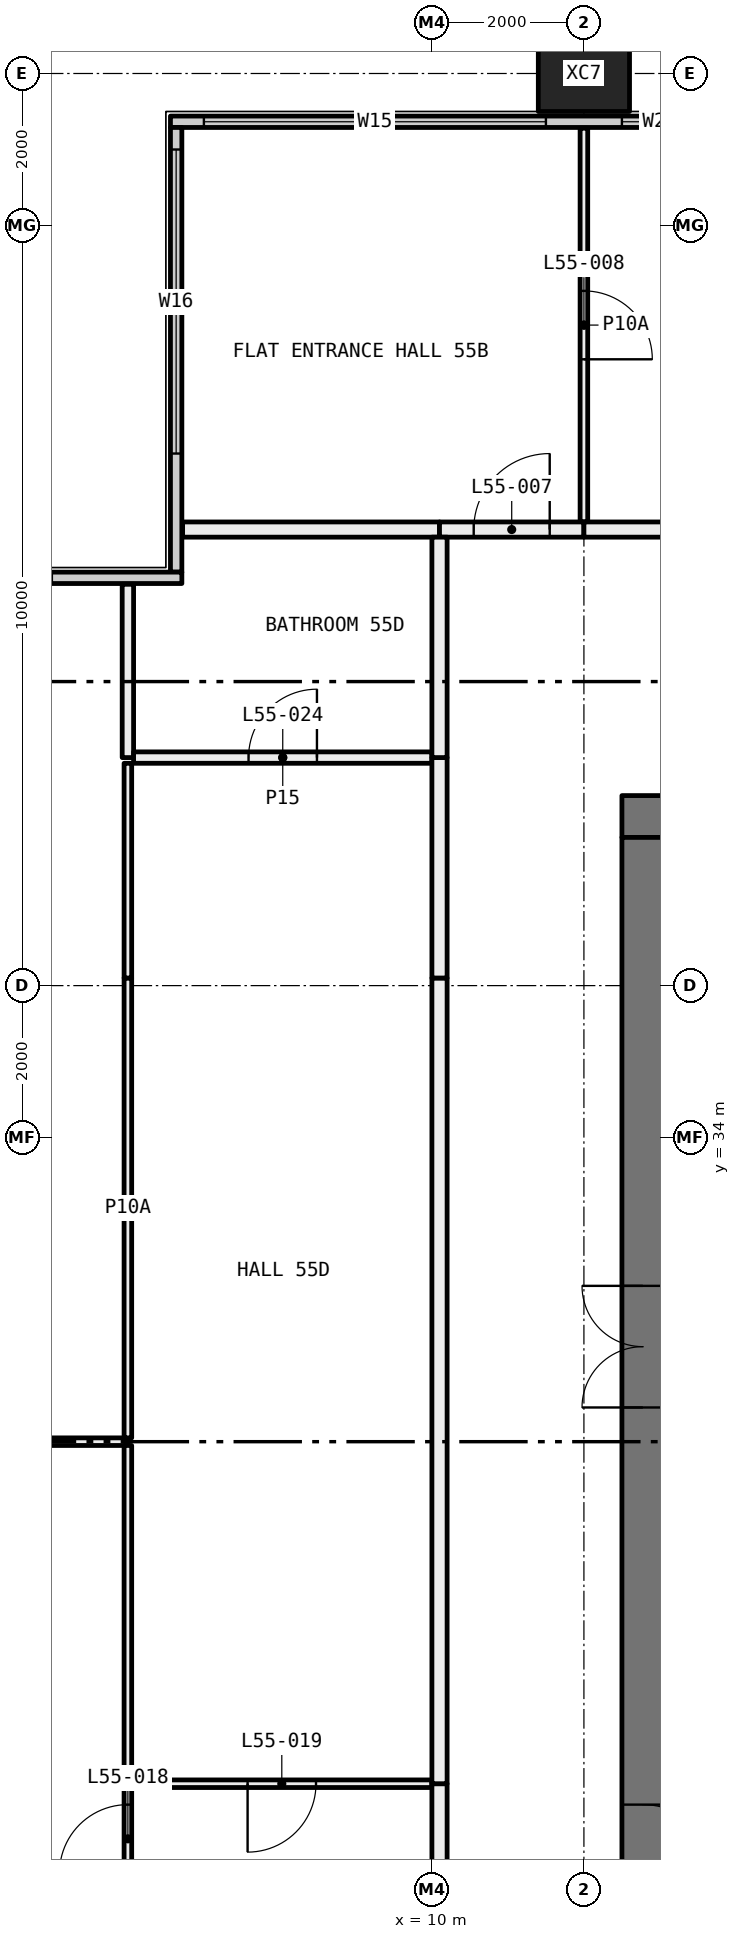
"""IFC4 building model, lengths in metres.
Left out: names, types, materials, properties, quantities, classifications, styles, units other than length and angle.
Written with IfcOpenShell. Run it as: python <this file> out.ifc"""

import sys

from ifc_helpers import new_model, si_unit, direction, frame, frame_2d, origin, origin_2d, place, context, subcontext, project, spatial, rectangle, hollow_rectangle, extrude, element, fill, save


model = new_model("IFC4")
c1 = context("Model", 3, precision=1e-05, world=origin(), true_north=direction((0.0, 1.0)))
c2 = subcontext(c1, "Body", "Model", "MODEL_VIEW")
j1 = project(units=[si_unit("LENGTHUNIT", "METRE"), si_unit("PLANEANGLEUNIT", "RADIAN")], contexts=[c1])
p1 = place(None, origin())
s1 = spatial("IfcSite", under=j1, at=p1, CompositionType="ELEMENT")
p2 = place(p1, origin())
s2 = spatial("IfcBuilding", under=s1, at=p2, CompositionType="ELEMENT")
p3 = place(p2, frame((0.0, 0.0, 206.55)))
s3 = spatial("IfcBuildingStorey", under=s2, at=p3, CompositionType="ELEMENT", Elevation=206.55)
p4 = place(p3, frame((12.0, 48.0, -0.4), z_axis=(0.0, 0.0, 1.0), x_axis=(1.0, 0.0, 0.0)))
e1 = element("IfcColumn", 1, at=p4, inside=s3, PredefinedType="COLUMN", context=c2, shape_type="SweptSolid", body=[
    extrude(hollow_rectangle(XDim=1.2, YDim=1.0, WallThickness=0.045, at=origin_2d()), origin(), (0.0, 0.0, 1.0), 3.45),
])
p5 = place(p3, frame((6.56, 47.365, 0.0), z_axis=(0.0, 0.0, 1.0), x_axis=(1.0, 0.0, 0.0)))
e2 = element("IfcWall", 2, at=p5, inside=s3, PredefinedType="ELEMENTEDWALL", context=c2, shape_type="SweptSolid", body=[
    extrude(rectangle(XDim=46.88, YDim=0.15, at=frame_2d((23.44, 0.0))), origin(), (0.0, 0.0, 1.0), 3.05),
])
p6 = place(p5, frame((0.44, 0.0, 0.45)))
e3 = element("IfcOpeningElement", 3, at=p6, cuts=e2, PredefinedType="OPENING", context=c2, shape_type="SweptSolid", body=[
    extrude(rectangle(XDim=4.5, YDim=2.55, at=frame_2d((2.25, 1.275))), frame((0.0, 0.085, 0.0), z_axis=(0.0, -1.0, 0.0), x_axis=(1.0, 0.0, 0.0)), (0.0, 0.0, 1.0), 0.17),
])
p7 = place(p5, frame((5.94, 0.0, 0.45)))
e4 = element("IfcOpeningElement", 4, at=p7, cuts=e2, PredefinedType="OPENING", context=c2, shape_type="SweptSolid", body=[
    extrude(rectangle(XDim=1.0, YDim=2.55, at=frame_2d((0.5, 1.275))), frame((0.0, 0.085, 0.0), z_axis=(0.0, -1.0, 0.0), x_axis=(1.0, 0.0, 0.0)), (0.0, 0.0, 1.0), 0.17),
])
p8 = place(p5, frame((9.44, 0.0, 0.45)))
e5 = element("IfcOpeningElement", 5, at=p8, cuts=e2, PredefinedType="OPENING", context=c2, shape_type="SweptSolid", body=[
    extrude(rectangle(XDim=1.5, YDim=2.55, at=frame_2d((0.75, 1.275))), frame((0.0, 0.085, 0.0), z_axis=(0.0, -1.0, 0.0), x_axis=(1.0, 0.0, 0.0)), (0.0, 0.0, 1.0), 0.17),
])
p9 = place(p5, frame((11.94, 0.0, 0.45)))
e6 = element("IfcOpeningElement", 6, at=p9, cuts=e2, PredefinedType="OPENING", context=c2, shape_type="SweptSolid", body=[
    extrude(rectangle(XDim=1.5, YDim=2.55, at=frame_2d((0.75, 1.275))), frame((0.0, 0.085, 0.0), z_axis=(0.0, -1.0, 0.0), x_axis=(1.0, 0.0, 0.0)), (0.0, 0.0, 1.0), 0.17),
])
p10 = place(p5, frame((15.94, 0.0, 0.45)))
e7 = element("IfcOpeningElement", 7, at=p10, cuts=e2, PredefinedType="OPENING", context=c2, shape_type="SweptSolid", body=[
    extrude(rectangle(XDim=1.0, YDim=2.55, at=frame_2d((0.5, 1.275))), frame((0.0, 0.085, 0.0), z_axis=(0.0, -1.0, 0.0), x_axis=(1.0, 0.0, 0.0)), (0.0, 0.0, 1.0), 0.17),
])
p11 = place(p5, frame((17.94, 0.0, 0.45)))
e8 = element("IfcOpeningElement", 8, at=p11, cuts=e2, PredefinedType="OPENING", context=c2, shape_type="SweptSolid", body=[
    extrude(rectangle(XDim=1.0, YDim=2.55, at=frame_2d((0.5, 1.275))), frame((0.0, 0.085, 0.0), z_axis=(0.0, -1.0, 0.0), x_axis=(1.0, 0.0, 0.0)), (0.0, 0.0, 1.0), 0.17),
])
p12 = place(p5, frame((21.44, 0.0, 0.45)))
e9 = element("IfcOpeningElement", 9, at=p12, cuts=e2, PredefinedType="OPENING", context=c2, shape_type="SweptSolid", body=[
    extrude(rectangle(XDim=1.5, YDim=2.55, at=frame_2d((0.75, 1.275))), frame((0.0, 0.085, 0.0), z_axis=(0.0, -1.0, 0.0), x_axis=(1.0, 0.0, 0.0)), (0.0, 0.0, 1.0), 0.17),
])
p13 = place(p5, frame((23.94, 0.0, 0.45)))
e10 = element("IfcOpeningElement", 10, at=p13, cuts=e2, PredefinedType="OPENING", context=c2, shape_type="SweptSolid", body=[
    extrude(rectangle(XDim=1.5, YDim=2.55, at=frame_2d((0.75, 1.275))), frame((0.0, 0.085, 0.0), z_axis=(0.0, -1.0, 0.0), x_axis=(1.0, 0.0, 0.0)), (0.0, 0.0, 1.0), 0.17),
])
p14 = place(p5, frame((27.94, 0.0, 0.45)))
e11 = element("IfcOpeningElement", 11, at=p14, cuts=e2, PredefinedType="OPENING", context=c2, shape_type="SweptSolid", body=[
    extrude(rectangle(XDim=1.0, YDim=2.55, at=frame_2d((0.5, 1.275))), frame((0.0, 0.085, 0.0), z_axis=(0.0, -1.0, 0.0), x_axis=(1.0, 0.0, 0.0)), (0.0, 0.0, 1.0), 0.17),
])
p15 = place(p5, frame((29.94, 0.0, 0.45)))
e12 = element("IfcOpeningElement", 12, at=p15, cuts=e2, PredefinedType="OPENING", context=c2, shape_type="SweptSolid", body=[
    extrude(rectangle(XDim=1.0, YDim=2.55, at=frame_2d((0.5, 1.275))), frame((0.0, 0.085, 0.0), z_axis=(0.0, -1.0, 0.0), x_axis=(1.0, 0.0, 0.0)), (0.0, 0.0, 1.0), 0.17),
])
p16 = place(p5, frame((33.44, 0.0, 0.45)))
e13 = element("IfcOpeningElement", 13, at=p16, cuts=e2, PredefinedType="OPENING", context=c2, shape_type="SweptSolid", body=[
    extrude(rectangle(XDim=1.5, YDim=2.55, at=frame_2d((0.75, 1.275))), frame((0.0, 0.085, 0.0), z_axis=(0.0, -1.0, 0.0), x_axis=(1.0, 0.0, 0.0)), (0.0, 0.0, 1.0), 0.17),
])
p17 = place(p5, frame((35.94, 0.0, 0.45)))
e14 = element("IfcOpeningElement", 14, at=p17, cuts=e2, PredefinedType="OPENING", context=c2, shape_type="SweptSolid", body=[
    extrude(rectangle(XDim=1.5, YDim=2.55, at=frame_2d((0.75, 1.275))), frame((0.0, 0.085, 0.0), z_axis=(0.0, -1.0, 0.0), x_axis=(1.0, 0.0, 0.0)), (0.0, 0.0, 1.0), 0.17),
])
p18 = place(p5, frame((39.94, 0.0, 0.45)))
e15 = element("IfcOpeningElement", 15, at=p18, cuts=e2, PredefinedType="OPENING", context=c2, shape_type="SweptSolid", body=[
    extrude(rectangle(XDim=1.0, YDim=2.55, at=frame_2d((0.5, 1.275))), frame((0.0, 0.085, 0.0), z_axis=(0.0, -1.0, 0.0), x_axis=(1.0, 0.0, 0.0)), (0.0, 0.0, 1.0), 0.17),
])
p19 = place(p5, frame((41.94, 0.0, 0.45)))
e16 = element("IfcOpeningElement", 16, at=p19, cuts=e2, PredefinedType="OPENING", context=c2, shape_type="SweptSolid", body=[
    extrude(rectangle(XDim=4.5, YDim=2.55, at=frame_2d((2.25, 1.275))), frame((0.0, 0.085, 0.0), z_axis=(0.0, -1.0, 0.0), x_axis=(1.0, 0.0, 0.0)), (0.0, 0.0, 1.0), 0.17),
])
p20 = place(p3, frame((6.635, 41.44, 0.0), z_axis=(0.0, 0.0, 1.0), x_axis=(0.0, 1.0, 0.0)))
e17 = element("IfcWall", 17, at=p20, inside=s3, PredefinedType="ELEMENTEDWALL", context=c2, shape_type="SweptSolid", body=[
    extrude(rectangle(XDim=5.85, YDim=0.15, at=frame_2d((2.925, 0.0))), origin(), (0.0, 0.0, 1.0), 3.05),
])
p21 = place(p20, frame((1.56, 0.0, 0.45)))
e18 = element("IfcOpeningElement", 18, at=p21, cuts=e17, PredefinedType="OPENING", context=c2, shape_type="SweptSolid", body=[
    extrude(rectangle(XDim=4.0, YDim=2.55, at=frame_2d((2.0, 1.275))), frame((0.0, 0.085, 0.0), z_axis=(0.0, -1.0, 0.0), x_axis=(1.0, 0.0, 0.0)), (0.0, 0.0, 1.0), 0.17),
])
p22 = place(p3, frame((0.56, 41.365, 0.0), z_axis=(0.0, 0.0, 1.0), x_axis=(1.0, 0.0, 0.0)))
e19 = element("IfcWall", 19, at=p22, inside=s3, PredefinedType="ELEMENTEDWALL", context=c2, shape_type="SweptSolid", body=[
    extrude(rectangle(XDim=6.15, YDim=0.15, at=frame_2d((3.075, 0.0))), origin(), (0.0, 0.0, 1.0), 3.05),
])
p23 = place(p22, frame((0.44, 0.0, 0.45)))
e20 = element("IfcOpeningElement", 20, at=p23, cuts=e19, PredefinedType="OPENING", context=c2, shape_type="SweptSolid", body=[
    extrude(rectangle(XDim=4.0, YDim=2.55, at=frame_2d((2.0, 1.275))), frame((0.0, 0.085, 0.0), z_axis=(0.0, -1.0, 0.0), x_axis=(1.0, 0.0, 0.0)), (0.0, 0.0, 1.0), 0.17),
])
p24 = place(p3, frame((12.0, 42.1, 0.0), z_axis=(0.0, 0.0, 1.0), x_axis=(0.0, 1.0, 0.0)))
e21 = element("IfcWall", 21, at=p24, inside=s3, PredefinedType="PARTITIONING", context=c2, shape_type="SweptSolid", body=[
    extrude(rectangle(XDim=5.18, YDim=0.1, at=frame_2d((2.59, 0.0))), origin(), (0.0, 0.0, 1.0), 3.05),
])
p25 = place(p24, frame((2.14, 0.0, 0.0)))
e22 = element("IfcOpeningElement", 22, at=p25, cuts=e21, PredefinedType="OPENING", context=c2, shape_type="SweptSolid", body=[
    extrude(rectangle(XDim=0.9, YDim=2.1, at=frame_2d((0.45, 1.05))), frame((0.0, 0.06, 0.0), z_axis=(0.0, -1.0, 0.0), x_axis=(1.0, 0.0, 0.0)), (0.0, 0.0, 1.0), 0.12),
])
p26 = place(p3, frame((6.72, 42.0, 0.0), z_axis=(0.0, 0.0, 1.0), x_axis=(1.0, 0.0, 0.0)))
e23 = element("IfcWall", 23, at=p26, inside=s3, PredefinedType="PARTITIONING", context=c2, shape_type="SweptSolid", body=[
    extrude(rectangle(XDim=3.38, YDim=0.2, at=frame_2d((1.69, 0.0))), origin(), (0.0, 0.0, 1.0), 3.05),
])
p27 = place(p3, frame((10.1, 42.0, 0.0), z_axis=(0.0, 0.0, 1.0), x_axis=(1.0, 0.0, 0.0)))
e24 = element("IfcWall", 24, at=p27, inside=s3, PredefinedType="PARTITIONING", context=c2, shape_type="SweptSolid", body=[
    extrude(rectangle(XDim=1.9, YDim=0.2, at=frame_2d((0.95, 0.0))), origin(), (0.0, 0.0, 1.0), 3.05),
])
p28 = place(p27, frame((0.45, 0.0, 0.0)))
e25 = element("IfcOpeningElement", 25, at=p28, cuts=e24, PredefinedType="OPENING", context=c2, shape_type="SweptSolid", body=[
    extrude(rectangle(XDim=1.0, YDim=2.1, at=frame_2d((0.5, 1.05))), frame((0.0, 0.11, 0.0), z_axis=(0.0, -1.0, 0.0), x_axis=(1.0, 0.0, 0.0)), (0.0, 0.0, 1.0), 0.22),
])
p29 = place(p3, frame((12.0, 42.0, 0.0), z_axis=(0.0, 0.0, 1.0), x_axis=(1.0, 0.0, 0.0)))
e26 = element("IfcWall", 26, at=p29, inside=s3, PredefinedType="PARTITIONING", context=c2, shape_type="SweptSolid", body=[
    extrude(rectangle(XDim=6.0, YDim=0.2, at=frame_2d((3.0, 0.0))), origin(), (0.0, 0.0, 1.0), 3.05),
])
p30 = place(p3, frame((6.0, 30.0, 0.0), z_axis=(0.0, 0.0, 1.0), x_axis=(-1.0, 0.0, 0.0)))
e27 = element("IfcWall", 27, at=p30, inside=s3, PredefinedType="PARTITIONING", context=c2, shape_type="SweptSolid", body=[
    extrude(rectangle(XDim=5.28, YDim=0.1, at=frame_2d((2.64, 0.0))), origin(), (0.0, 0.0, 1.0), 3.05),
])
p31 = place(p30, frame((2.19, 0.0, 0.0)))
e28 = element("IfcOpeningElement", 28, at=p31, cuts=e27, PredefinedType="OPENING", context=c2, shape_type="SweptSolid", body=[
    extrude(rectangle(XDim=0.9, YDim=2.1, at=frame_2d((0.45, 1.05))), frame((0.0, 0.06, 0.0), z_axis=(0.0, -1.0, 0.0), x_axis=(1.0, 0.0, 0.0)), (0.0, 0.0, 1.0), 0.12),
])
p32 = place(p3, frame((6.0, 24.05, 0.0), z_axis=(0.0, 0.0, 1.0), x_axis=(0.0, 1.0, 0.0)))
e29 = element("IfcWall", 29, at=p32, inside=s3, PredefinedType="PARTITIONING", context=c2, shape_type="SweptSolid", body=[
    extrude(rectangle(XDim=1.45, YDim=0.1, at=frame_2d((0.725, 0.0))), origin(), (0.0, 0.0, 1.0), 2.45),
])
p33 = place(p32, frame((0.275, 0.0, 0.0)))
e30 = element("IfcOpeningElement", 30, at=p33, cuts=e29, PredefinedType="OPENING", context=c2, shape_type="SweptSolid", body=[
    extrude(rectangle(XDim=0.9, YDim=2.1, at=frame_2d((0.45, 1.05))), frame((0.0, 0.06, 0.0), z_axis=(0.0, -1.0, 0.0), x_axis=(1.0, 0.0, 0.0)), (0.0, 0.0, 1.0), 0.12),
])
p34 = place(p3, frame((6.0, 25.5, 0.0), z_axis=(0.0, 0.0, 1.0), x_axis=(0.0, 1.0, 0.0)))
e31 = element("IfcWall", 31, at=p34, inside=s3, PredefinedType="PARTITIONING", context=c2, shape_type="SweptSolid", body=[
    extrude(rectangle(XDim=4.45, YDim=0.1, at=frame_2d((2.225, 0.0))), origin(), (0.0, 0.0, 1.0), 3.05),
])
p35 = place(p3, frame((6.0, 30.05, 0.0), z_axis=(0.0, 0.0, 1.0), x_axis=(0.0, 1.0, 0.0)))
e32 = element("IfcWall", 32, at=p35, inside=s3, PredefinedType="PARTITIONING", context=c2, shape_type="SweptSolid", body=[
    extrude(rectangle(XDim=6.05, YDim=0.1, at=frame_2d((3.025, 0.0))), origin(), (0.0, 0.0, 1.0), 2.45),
])
p36 = place(p3, frame((6.0, 36.1, 0.0), z_axis=(0.0, 0.0, 1.0), x_axis=(0.0, 1.0, 0.0)))
e33 = element("IfcWall", 33, at=p36, inside=s3, PredefinedType="PARTITIONING", context=c2, shape_type="SweptSolid", body=[
    extrude(rectangle(XDim=2.825, YDim=0.1, at=frame_2d((1.413, 0.0))), origin(), (0.0, 0.0, 1.0), 3.05),
])
p37 = place(p3, frame((6.0, 39.0, 0.0), z_axis=(0.0, 0.0, 1.0), x_axis=(0.0, 1.0, 0.0)))
e34 = element("IfcWall", 34, at=p37, inside=s3, PredefinedType="PARTITIONING", context=c2, shape_type="SweptSolid", body=[
    extrude(rectangle(XDim=2.28, YDim=0.15, at=frame_2d((1.14, 0.0))), origin(), (0.0, 0.0, 1.0), 3.05),
])
p38 = place(p3, frame((10.0, 25.5, 0.0), z_axis=(0.0, 0.0, 1.0), x_axis=(-1.0, 0.0, 0.0)))
e35 = element("IfcWall", 35, at=p38, inside=s3, PredefinedType="PARTITIONING", context=c2, shape_type="SweptSolid", body=[
    extrude(rectangle(XDim=3.95, YDim=0.1, at=frame_2d((1.975, 0.0))), origin(), (0.0, 0.0, 1.0), 3.05),
])
p39 = place(p38, frame((1.525, 0.0, 0.0)))
e36 = element("IfcOpeningElement", 36, at=p39, cuts=e35, PredefinedType="OPENING", context=c2, shape_type="SweptSolid", body=[
    extrude(rectangle(XDim=0.9, YDim=2.1, at=frame_2d((0.45, 1.05))), frame((0.0, 0.06, 0.0), z_axis=(0.0, -1.0, 0.0), x_axis=(1.0, 0.0, 0.0)), (0.0, 0.0, 1.0), 0.12),
])
p40 = place(p3, frame((10.1, 24.1, 0.0), z_axis=(0.0, 0.0, 1.0), x_axis=(0.0, 1.0, 0.0)))
e37 = element("IfcWall", 37, at=p40, inside=s3, PredefinedType="PARTITIONING", context=c2, shape_type="SweptSolid", body=[
    extrude(rectangle(XDim=1.4, YDim=0.2, at=frame_2d((0.7, 0.0))), origin(), (0.0, 0.0, 1.0), 3.05),
])
p41 = place(p3, frame((10.0, 39.0, 0.0), z_axis=(0.0, 0.0, 1.0), x_axis=(-1.0, 0.0, 0.0)))
e38 = element("IfcWall", 38, at=p41, inside=s3, PredefinedType="PARTITIONING", context=c2, shape_type="SweptSolid", body=[
    extrude(rectangle(XDim=3.925, YDim=0.15, at=frame_2d((1.962, 0.0))), origin(), (0.0, 0.0, 1.0), 3.05),
])
p42 = place(p41, frame((1.512, 0.0, 0.0)))
e39 = element("IfcOpeningElement", 39, at=p42, cuts=e38, PredefinedType="OPENING", context=c2, shape_type="SweptSolid", body=[
    extrude(rectangle(XDim=0.9, YDim=2.1, at=frame_2d((0.45, 1.05))), frame((0.0, 0.085, 0.0), z_axis=(0.0, -1.0, 0.0), x_axis=(1.0, 0.0, 0.0)), (0.0, 0.0, 1.0), 0.17),
])
p43 = place(p3, frame((10.1, 25.5, 0.0), z_axis=(0.0, 0.0, 1.0), x_axis=(0.0, 1.0, 0.0)))
e40 = element("IfcWall", 40, at=p43, inside=s3, PredefinedType="PARTITIONING", context=c2, shape_type="SweptSolid", body=[
    extrude(rectangle(XDim=10.6, YDim=0.2, at=frame_2d((5.3, 0.0))), origin(), (0.0, 0.0, 1.0), 2.45),
])
for number, where, z_axis, x_axis in (
    (41, (10.1, 36.1, 0.0), (0.0, 0.0, 1.0), (0.0, 1.0, 0.0)),
    (42, (10.1, 39.0, 0.0), (0.0, 0.0, 1.0), (0.0, 1.0, 0.0)),
):
    element("IfcWall", number, at=place(p3, frame(where, z_axis=z_axis, x_axis=x_axis)), inside=s3, PredefinedType="PARTITIONING", context=c2, shape_type="SweptSolid", body=[
        extrude(rectangle(XDim=2.9, YDim=0.2, at=frame_2d((1.45, 0.0))), origin(), (0.0, 0.0, 1.0), 3.05),
    ])
p44 = place(p3, frame((12.5, 38.225, 0.0), z_axis=(0.0, 0.0, 1.0), x_axis=(1.0, 0.0, 0.0)))
e43 = element("IfcWall", 43, at=p44, inside=s3, PredefinedType="SHEAR", context=c2, shape_type="SweptSolid", body=[
    extrude(rectangle(XDim=11.0, YDim=0.55, at=frame_2d((5.5, 0.0))), origin(), (0.0, 0.0, 1.0), 3.05),
])
p45 = place(p44, frame((8.525, 0.0, 0.0)))
e44 = element("IfcOpeningElement", 44, at=p45, cuts=e43, PredefinedType="OPENING", context=c2, shape_type="SweptSolid", body=[
    extrude(rectangle(XDim=1.6, YDim=2.1, at=frame_2d((0.8, 1.05))), frame((0.0, 0.285, 0.0), z_axis=(0.0, -1.0, 0.0), x_axis=(1.0, 0.0, 0.0)), (0.0, 0.0, 1.0), 0.57),
])
p46 = place(p3, frame((12.775, 22.05, 0.0), z_axis=(0.0, 0.0, 1.0), x_axis=(0.0, 1.0, 0.0)))
e45 = element("IfcWall", 45, at=p46, inside=s3, PredefinedType="SHEAR", context=c2, shape_type="SweptSolid", body=[
    extrude(rectangle(XDim=15.9, YDim=0.55, at=frame_2d((7.95, 0.0))), origin(), (0.0, 0.0, 1.0), 3.05),
])
p47 = place(p46, frame((8.4, 0.0, 0.0)))
e46 = element("IfcOpeningElement", 46, at=p47, cuts=e45, PredefinedType="OPENING", context=c2, shape_type="SweptSolid", body=[
    extrude(rectangle(XDim=1.6, YDim=2.1, at=frame_2d((0.8, 1.05))), frame((0.0, 0.285, 0.0), z_axis=(0.0, -1.0, 0.0), x_axis=(1.0, 0.0, 0.0)), (0.0, 0.0, 1.0), 0.57),
])
p48 = place(p46, frame((2.175, 0.0, 0.0)))
e47 = element("IfcOpeningElement", 47, at=p48, cuts=e45, PredefinedType="OPENING", context=c2, shape_type="SweptSolid", body=[
    extrude(rectangle(XDim=1.0, YDim=2.1, at=frame_2d((0.5, 1.05))), frame((0.0, 0.285, 0.0), z_axis=(0.0, -1.0, 0.0), x_axis=(1.0, 0.0, 0.0)), (0.0, 0.0, 1.0), 0.57),
])
p49 = place(p6, origin())
e48 = element("IfcWindow", 48, at=p49, inside=s3, PartitioningType="SINGLE_PANEL", PredefinedType="WINDOW", context=c2, shape_type="SweptSolid", body=[
    extrude(rectangle(XDim=4.5, YDim=2.55, at=frame_2d((2.25, 1.275))), frame((0.0, 0.03, 0.0), z_axis=(0.0, -1.0, 0.0), x_axis=(1.0, 0.0, 0.0)), (0.0, 0.0, 1.0), 0.06),
])
fill(e3, e48)
p50 = place(p7, origin())
e49 = element("IfcWindow", 49, at=p50, inside=s3, PartitioningType="SINGLE_PANEL", PredefinedType="WINDOW", context=c2, shape_type="SweptSolid", body=[
    extrude(rectangle(XDim=1.0, YDim=2.55, at=frame_2d((0.5, 1.275))), frame((0.0, 0.03, 0.0), z_axis=(0.0, -1.0, 0.0), x_axis=(1.0, 0.0, 0.0)), (0.0, 0.0, 1.0), 0.06),
])
fill(e4, e49)
p51 = place(p21, origin())
e50 = element("IfcWindow", 50, at=p51, inside=s3, PartitioningType="SINGLE_PANEL", PredefinedType="WINDOW", context=c2, shape_type="SweptSolid", body=[
    extrude(rectangle(XDim=4.0, YDim=2.55, at=frame_2d((2.0, 1.275))), frame((0.0, 0.03, 0.0), z_axis=(0.0, -1.0, 0.0), x_axis=(1.0, 0.0, 0.0)), (0.0, 0.0, 1.0), 0.06),
])
fill(e18, e50)
p52 = place(p28, origin())
e51 = element("IfcDoor", 51, at=p52, inside=s3, OperationType="SINGLE_SWING_LEFT", PredefinedType="DOOR", context=c2, shape_type="SweptSolid", body=[
    extrude(rectangle(XDim=1.0, YDim=2.1, at=frame_2d((0.5, 1.05))), frame((0.0, 0.025, 0.0), z_axis=(0.0, -1.0, 0.0), x_axis=(1.0, 0.0, 0.0)), (0.0, 0.0, 1.0), 0.05),
])
fill(e25, e51)
p53 = place(p25, frame((0.9, 0.0, 0.0), x_axis=(-1.0, 0.0, 0.0)))
e52 = element("IfcDoor", 52, at=p53, inside=s3, OperationType="SINGLE_SWING_LEFT", PredefinedType="DOOR", context=c2, shape_type="SweptSolid", body=[
    extrude(rectangle(XDim=0.9, YDim=2.1, at=frame_2d((0.45, 1.05))), frame((0.0, 0.025, 0.0), z_axis=(0.0, -1.0, 0.0), x_axis=(1.0, 0.0, 0.0)), (0.0, 0.0, 1.0), 0.05),
])
fill(e22, e52)
p54 = place(p33, origin())
e53 = element("IfcDoor", 53, at=p54, inside=s3, OperationType="SINGLE_SWING_RIGHT", PredefinedType="DOOR", context=c2, shape_type="SweptSolid", body=[
    extrude(rectangle(XDim=0.9, YDim=2.1, at=frame_2d((0.45, 1.05))), frame((0.0, 0.025, 0.0), z_axis=(0.0, -1.0, 0.0), x_axis=(1.0, 0.0, 0.0)), (0.0, 0.0, 1.0), 0.05),
])
fill(e30, e53)
p55 = place(p39, origin())
e54 = element("IfcDoor", 54, at=p55, inside=s3, OperationType="SINGLE_SWING_LEFT", PredefinedType="DOOR", context=c2, shape_type="SweptSolid", body=[
    extrude(rectangle(XDim=0.9, YDim=2.1, at=frame_2d((0.45, 1.05))), frame((0.0, 0.025, 0.0), z_axis=(0.0, -1.0, 0.0), x_axis=(1.0, 0.0, 0.0)), (0.0, 0.0, 1.0), 0.05),
])
fill(e36, e54)
p56 = place(p42, frame((0.9, 0.0, 0.0), x_axis=(-1.0, 0.0, 0.0)))
e55 = element("IfcDoor", 55, at=p56, inside=s3, OperationType="SINGLE_SWING_LEFT", PredefinedType="DOOR", context=c2, shape_type="SweptSolid", body=[
    extrude(rectangle(XDim=0.9, YDim=2.1, at=frame_2d((0.45, 1.05))), frame((0.0, 0.025, 0.0), z_axis=(0.0, -1.0, 0.0), x_axis=(1.0, 0.0, 0.0)), (0.0, 0.0, 1.0), 0.05),
])
fill(e39, e55)
p57 = place(p47, origin())
e56 = element("IfcDoor", 56, at=p57, inside=s3, OperationType="DOUBLE_DOOR_SINGLE_SWING", PredefinedType="DOOR", context=c2, shape_type="SweptSolid", body=[
    extrude(rectangle(XDim=1.6, YDim=2.1, at=frame_2d((0.8, 1.05))), frame((0.0, 0.025, 0.0), z_axis=(0.0, -1.0, 0.0), x_axis=(1.0, 0.0, 0.0)), (0.0, 0.0, 1.0), 0.05),
])
fill(e46, e56)
p58 = place(p48, frame((1.0, 0.0, 0.0), x_axis=(-1.0, 0.0, 0.0)))
e57 = element("IfcDoor", 57, at=p58, inside=s3, OperationType="SINGLE_SWING_LEFT", PredefinedType="DOOR", context=c2, shape_type="SweptSolid", body=[
    extrude(rectangle(XDim=1.0, YDim=2.1, at=frame_2d((0.5, 1.05))), frame((0.0, 0.025, 0.0), z_axis=(0.0, -1.0, 0.0), x_axis=(1.0, 0.0, 0.0)), (0.0, 0.0, 1.0), 0.05),
])
fill(e47, e57)
save(model, sys.argv[1])
